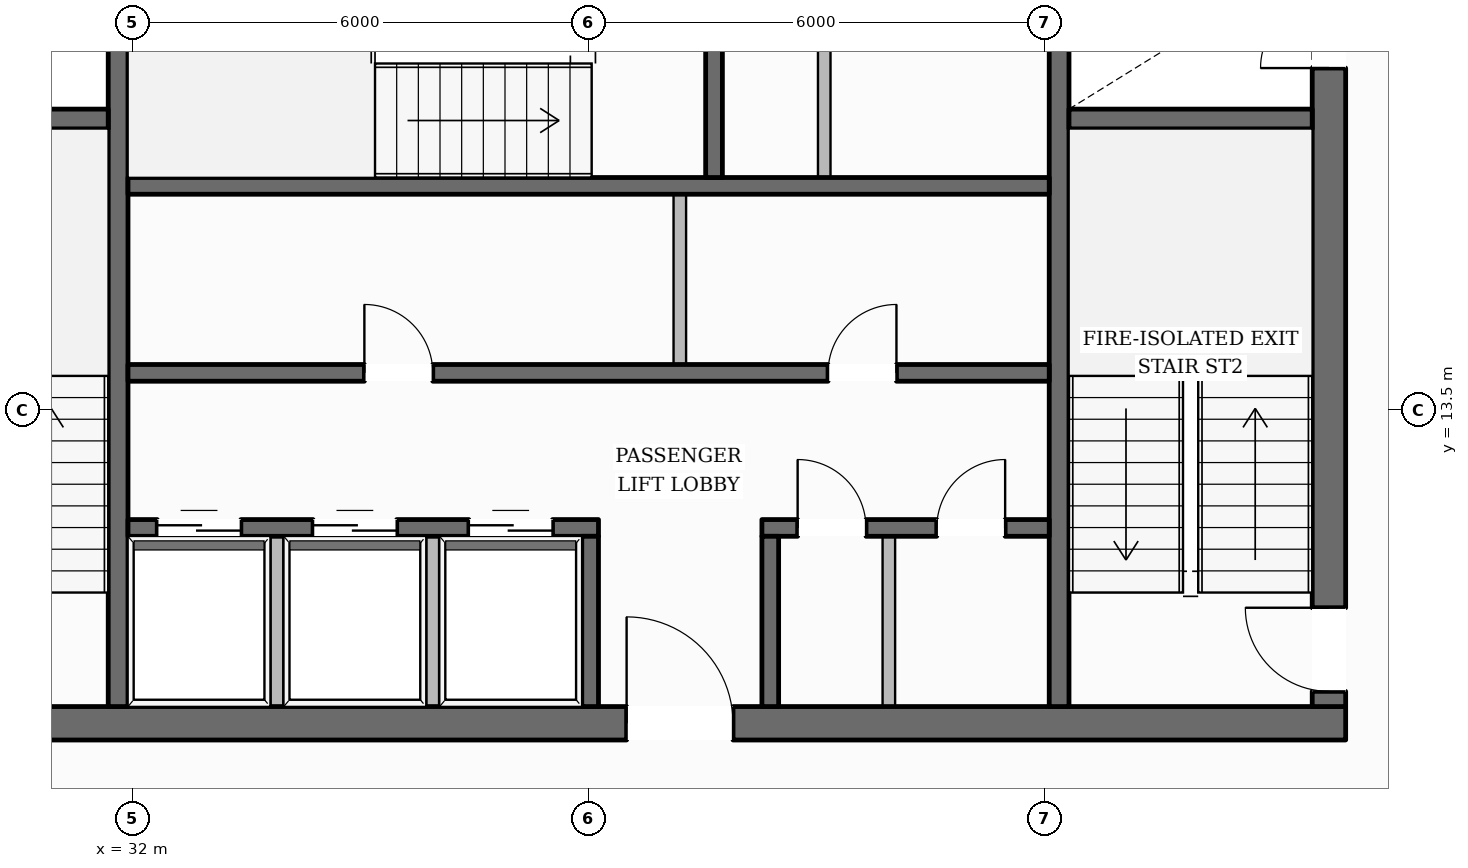
"""IFC4 building model, lengths in metres.
Left out: names, types, materials, properties, quantities, classifications, styles, units other than length and angle.
Written with IfcOpenShell. Run it as: python <this file> out.ifc"""

import sys

from ifc_helpers import new_model, si_unit, direction, frame, frame_2d, origin, place, context, subcontext, project, spatial, rectangle, extrude, element, fill, save


model = new_model("IFC4")
c1 = context("Model", 3, precision=1e-05, world=origin(), true_north=direction((0.0, 1.0)))
c2 = subcontext(c1, "Body", "Model", "MODEL_VIEW")
j1 = project(units=[si_unit("LENGTHUNIT", "METRE"), si_unit("PLANEANGLEUNIT", "RADIAN")], contexts=[c1])
p1 = place(None, origin())
s1 = spatial("IfcSite", under=j1, at=p1, CompositionType="ELEMENT")
p2 = place(p1, origin())
s2 = spatial("IfcBuilding", under=s1, at=p2, CompositionType="ELEMENT")
p3 = place(p2, frame((0.0, 0.0, 176.55)))
s3 = spatial("IfcBuildingStorey", under=s2, at=p3, CompositionType="ELEMENT", Elevation=176.55)
p4 = place(p3, frame((28.04, 9.38, 0.0), z_axis=(0.0, 0.0, 1.0), x_axis=(1.0, 0.0, 0.0)))
e1 = element("IfcWall", 1, at=p4, inside=s3, PredefinedType="SOLIDWALL", context=c2, shape_type="SweptSolid", body=[
    extrude(rectangle(XDim=19.92, YDim=0.44, at=frame_2d((9.96, 0.0))), origin(), (0.0, 0.0, 1.0), 3.6),
])
p5 = place(p4, frame((10.46, 0.0, 0.0)))
e2 = element("IfcOpeningElement", 2, at=p5, cuts=e1, PredefinedType="OPENING", context=c2, shape_type="SweptSolid", body=[
    extrude(rectangle(XDim=1.4, YDim=2.2, at=frame_2d((0.7, 1.1))), frame((0.0, 0.23, 0.0), z_axis=(0.0, -1.0, 0.0), x_axis=(1.0, 0.0, 0.0)), (0.0, 0.0, 1.0), 0.46),
])
p6 = place(p3, frame((47.74, 9.6, 0.0), z_axis=(0.0, 0.0, 1.0), x_axis=(0.0, 1.0, 0.0)))
e3 = element("IfcWall", 3, at=p6, inside=s3, PredefinedType="SOLIDWALL", context=c2, shape_type="SweptSolid", body=[
    extrude(rectangle(XDim=13.0, YDim=0.44, at=frame_2d((6.5, 0.0))), origin(), (0.0, 0.0, 1.0), 3.6),
])
p7 = place(p6, frame((0.2, 0.0, 0.0)))
e4 = element("IfcOpeningElement", 4, at=p7, cuts=e3, PredefinedType="OPENING", context=c2, shape_type="SweptSolid", body=[
    extrude(rectangle(XDim=1.1, YDim=2.15, at=frame_2d((0.55, 1.075))), frame((0.0, 0.23, 0.0), z_axis=(0.0, -1.0, 0.0), x_axis=(1.0, 0.0, 0.0)), (0.0, 0.0, 1.0), 0.46),
])
p8 = place(p6, frame((8.4, 0.0, 0.0)))
e5 = element("IfcOpeningElement", 5, at=p8, cuts=e3, PredefinedType="OPENING", context=c2, shape_type="SweptSolid", body=[
    extrude(rectangle(XDim=0.9, YDim=2.1, at=frame_2d((0.45, 1.05))), frame((0.0, 0.23, 0.0), z_axis=(0.0, -1.0, 0.0), x_axis=(1.0, 0.0, 0.0)), (0.0, 0.0, 1.0), 0.46),
])
p9 = place(p3, frame((31.81, 9.6, 0.0), z_axis=(0.0, 0.0, 1.0), x_axis=(0.0, 1.0, 0.0)))
e6 = element("IfcWall", 6, at=p9, inside=s3, PredefinedType="SHEAR", context=c2, shape_type="SweptSolid", body=[
    extrude(rectangle(XDim=13.0, YDim=0.26, at=frame_2d((6.5, 0.0))), origin(), (0.0, 0.0, 1.0), 3.6),
])
p10 = place(p9, frame((10.925, 0.0, 0.0)))
e7 = element("IfcOpeningElement", 7, at=p10, cuts=e6, PredefinedType="OPENING", context=c2, shape_type="SweptSolid", body=[
    extrude(rectangle(XDim=1.25, YDim=2.25, at=frame_2d((0.625, 1.125))), frame((0.0, 0.14, 0.0), z_axis=(0.0, -1.0, 0.0), x_axis=(1.0, 0.0, 0.0)), (0.0, 0.0, 1.0), 0.28),
])
p11 = place(p3, frame((44.19, 9.6, 0.0), z_axis=(0.0, 0.0, 1.0), x_axis=(0.0, 1.0, 0.0)))
e8 = element("IfcWall", 8, at=p11, inside=s3, PredefinedType="SHEAR", context=c2, shape_type="SweptSolid", body=[
    extrude(rectangle(XDim=13.0, YDim=0.26, at=frame_2d((6.5, 0.0))), origin(), (0.0, 0.0, 1.0), 3.6),
])
p12 = place(p11, frame((10.925, 0.0, 0.0)))
e9 = element("IfcOpeningElement", 9, at=p12, cuts=e8, PredefinedType="OPENING", context=c2, shape_type="SweptSolid", body=[
    extrude(rectangle(XDim=1.25, YDim=2.25, at=frame_2d((0.625, 1.125))), frame((0.0, 0.14, 0.0), z_axis=(0.0, -1.0, 0.0), x_axis=(1.0, 0.0, 0.0)), (0.0, 0.0, 1.0), 0.28),
])
for number, where, z_axis, x_axis in (
    (10, (28.48, 17.33, 0.0), (0.0, 0.0, 1.0), (1.0, 0.0, 0.0)),
    (11, (44.32, 17.33, 0.0), (0.0, 0.0, 1.0), (1.0, 0.0, 0.0)),
):
    element("IfcWall", number, at=place(p3, frame(where, z_axis=z_axis, x_axis=x_axis)), inside=s3, PredefinedType="SHEAR", context=c2, shape_type="SweptSolid", body=[
        extrude(rectangle(XDim=3.2, YDim=0.26, at=frame_2d((1.6, 0.0))), origin(), (0.0, 0.0, 1.0), 3.6),
    ])
p13 = place(p3, frame((31.94, 16.45, 0.0), z_axis=(0.0, 0.0, 1.0), x_axis=(1.0, 0.0, 0.0)))
e12 = element("IfcWall", 12, at=p13, inside=s3, PredefinedType="SOLIDWALL", context=c2, shape_type="SweptSolid", body=[
    extrude(rectangle(XDim=12.12, YDim=0.22, at=frame_2d((6.06, 0.0))), origin(), (0.0, 0.0, 1.0), 3.6),
])
p14 = place(p3, frame((39.65, 16.56, 0.0), z_axis=(0.0, 0.0, 1.0), x_axis=(0.0, 1.0, 0.0)))
e13 = element("IfcWall", 13, at=p14, inside=s3, PredefinedType="SOLIDWALL", context=c2, shape_type="SweptSolid", body=[
    extrude(rectangle(XDim=3.2, YDim=0.22, at=frame_2d((1.6, 0.0))), origin(), (0.0, 0.0, 1.0), 3.6),
])
p15 = place(p3, frame((31.94, 13.99, 0.0), z_axis=(0.0, 0.0, 1.0), x_axis=(1.0, 0.0, 0.0)))
e14 = element("IfcWall", 14, at=p15, inside=s3, PredefinedType="SOLIDWALL", context=c2, shape_type="SweptSolid", body=[
    extrude(rectangle(XDim=12.12, YDim=0.22, at=frame_2d((6.06, 0.0))), origin(), (0.0, 0.0, 1.0), 3.6),
])
p16 = place(p15, frame((3.11, 0.0, 0.0)))
e15 = element("IfcOpeningElement", 15, at=p16, cuts=e14, PredefinedType="OPENING", context=c2, shape_type="SweptSolid", body=[
    extrude(rectangle(XDim=0.9, YDim=2.1, at=frame_2d((0.45, 1.05))), frame((0.0, 0.12, 0.0), z_axis=(0.0, -1.0, 0.0), x_axis=(1.0, 0.0, 0.0)), (0.0, 0.0, 1.0), 0.24),
])
p17 = place(p15, frame((9.21, 0.0, 0.0)))
e16 = element("IfcOpeningElement", 16, at=p17, cuts=e14, PredefinedType="OPENING", context=c2, shape_type="SweptSolid", body=[
    extrude(rectangle(XDim=0.9, YDim=2.1, at=frame_2d((0.45, 1.05))), frame((0.0, 0.12, 0.0), z_axis=(0.0, -1.0, 0.0), x_axis=(1.0, 0.0, 0.0)), (0.0, 0.0, 1.0), 0.24),
])
p18 = place(p3, frame((31.94, 11.95, 0.0), z_axis=(0.0, 0.0, 1.0), x_axis=(1.0, 0.0, 0.0)))
e17 = element("IfcWall", 17, at=p18, inside=s3, PredefinedType="SOLIDWALL", context=c2, shape_type="SweptSolid", body=[
    extrude(rectangle(XDim=6.19, YDim=0.22, at=frame_2d((3.095, 0.0))), origin(), (0.0, 0.0, 1.0), 3.6),
])
p19 = place(p18, frame((0.385, 0.0, 0.0)))
e18 = element("IfcOpeningElement", 18, at=p19, cuts=e17, PredefinedType="OPENING", context=c2, shape_type="SweptSolid", body=[
    extrude(rectangle(XDim=1.1, YDim=2.2, at=frame_2d((0.55, 1.1))), frame((0.0, 0.12, 0.0), z_axis=(0.0, -1.0, 0.0), x_axis=(1.0, 0.0, 0.0)), (0.0, 0.0, 1.0), 0.24),
])
p20 = place(p18, frame((2.435, 0.0, 0.0)))
e19 = element("IfcOpeningElement", 19, at=p20, cuts=e17, PredefinedType="OPENING", context=c2, shape_type="SweptSolid", body=[
    extrude(rectangle(XDim=1.1, YDim=2.2, at=frame_2d((0.55, 1.1))), frame((0.0, 0.12, 0.0), z_axis=(0.0, -1.0, 0.0), x_axis=(1.0, 0.0, 0.0)), (0.0, 0.0, 1.0), 0.24),
])
p21 = place(p18, frame((4.485, 0.0, 0.0)))
e20 = element("IfcOpeningElement", 20, at=p21, cuts=e17, PredefinedType="OPENING", context=c2, shape_type="SweptSolid", body=[
    extrude(rectangle(XDim=1.1, YDim=2.2, at=frame_2d((0.55, 1.1))), frame((0.0, 0.12, 0.0), z_axis=(0.0, -1.0, 0.0), x_axis=(1.0, 0.0, 0.0)), (0.0, 0.0, 1.0), 0.24),
])
p22 = place(p3, frame((40.28, 11.95, 0.0), z_axis=(0.0, 0.0, 1.0), x_axis=(1.0, 0.0, 0.0)))
e21 = element("IfcWall", 21, at=p22, inside=s3, PredefinedType="SOLIDWALL", context=c2, shape_type="SweptSolid", body=[
    extrude(rectangle(XDim=3.78, YDim=0.22, at=frame_2d((1.89, 0.0))), origin(), (0.0, 0.0, 1.0), 3.6),
])
p23 = place(p22, frame((0.47, 0.0, 0.0)))
e22 = element("IfcOpeningElement", 22, at=p23, cuts=e21, PredefinedType="OPENING", context=c2, shape_type="SweptSolid", body=[
    extrude(rectangle(XDim=0.9, YDim=2.1, at=frame_2d((0.45, 1.05))), frame((0.0, 0.12, 0.0), z_axis=(0.0, -1.0, 0.0), x_axis=(1.0, 0.0, 0.0)), (0.0, 0.0, 1.0), 0.24),
])
p24 = place(p22, frame((2.3, 0.0, 0.0)))
e23 = element("IfcOpeningElement", 23, at=p24, cuts=e21, PredefinedType="OPENING", context=c2, shape_type="SweptSolid", body=[
    extrude(rectangle(XDim=0.9, YDim=2.1, at=frame_2d((0.45, 1.05))), frame((0.0, 0.12, 0.0), z_axis=(0.0, -1.0, 0.0), x_axis=(1.0, 0.0, 0.0)), (0.0, 0.0, 1.0), 0.24),
])
for number, where, z_axis, x_axis in (
    (24, (38.02, 9.6, 0.0), (0.0, 0.0, 1.0), (0.0, 1.0, 0.0)),
    (25, (40.39, 9.6, 0.0), (0.0, 0.0, 1.0), (0.0, 1.0, 0.0)),
):
    element("IfcWall", number, at=place(p3, frame(where, z_axis=z_axis, x_axis=x_axis)), inside=s3, PredefinedType="SOLIDWALL", context=c2, shape_type="SweptSolid", body=[
        extrude(rectangle(XDim=2.24, YDim=0.22, at=frame_2d((1.12, 0.0))), origin(), (0.0, 0.0, 1.0), 3.6),
    ])
p25 = place(p3, frame((15.13, 12.109, 0.0), z_axis=(0.0, 0.0, 1.0), x_axis=(0.493717133856, 0.869622557054, 0.0)))
e26 = element("IfcWall", 26, at=p25, inside=s3, PredefinedType="STANDARD", context=c2, shape_type="SweptSolid", body=[
    extrude(rectangle(XDim=37.245, YDim=0.35, at=frame_2d((18.623, 0.0))), origin(), (0.0, 0.0, 1.0), 3.132),
])
p26 = place(p25, frame((27.334, 0.0, 0.0)))
e27 = element("IfcOpeningElement", 27, at=p26, cuts=e26, PredefinedType="OPENING", context=c2, shape_type="SweptSolid", body=[
    extrude(rectangle(XDim=1.0, YDim=2.2, at=frame_2d((0.5, 1.1))), frame((0.0, 0.185, 0.0), z_axis=(0.0, -1.0, 0.0), x_axis=(1.0, 0.0, 0.0)), (0.0, 0.0, 1.0), 0.37),
])
p27 = place(p25, frame((33.014, 0.0, 0.65)))
e28 = element("IfcOpeningElement", 28, at=p27, cuts=e26, PredefinedType="OPENING", context=c2, shape_type="SweptSolid", body=[
    extrude(rectangle(XDim=1.45, YDim=1.75, at=frame_2d((0.725, 0.875))), frame((0.0, 0.185, 0.0), z_axis=(0.0, -1.0, 0.0), x_axis=(1.0, 0.0, 0.0)), (0.0, 0.0, 1.0), 0.37),
])
p28 = place(p25, frame((20.918, 0.0, 0.65)))
e29 = element("IfcOpeningElement", 29, at=p28, cuts=e26, PredefinedType="OPENING", context=c2, shape_type="SweptSolid", body=[
    extrude(rectangle(XDim=1.45, YDim=1.75, at=frame_2d((0.725, 0.875))), frame((0.0, 0.185, 0.0), z_axis=(0.0, -1.0, 0.0), x_axis=(1.0, 0.0, 0.0)), (0.0, 0.0, 1.0), 0.37),
])
p29 = place(p25, frame((8.822, 0.0, 0.65)))
e30 = element("IfcOpeningElement", 30, at=p29, cuts=e26, PredefinedType="OPENING", context=c2, shape_type="SweptSolid", body=[
    extrude(rectangle(XDim=1.45, YDim=1.75, at=frame_2d((0.725, 0.875))), frame((0.0, 0.185, 0.0), z_axis=(0.0, -1.0, 0.0), x_axis=(1.0, 0.0, 0.0)), (0.0, 0.0, 1.0), 0.37),
])
p30 = place(p25, frame((2.774, 0.0, 0.65)))
e31 = element("IfcOpeningElement", 31, at=p30, cuts=e26, PredefinedType="OPENING", context=c2, shape_type="SweptSolid", body=[
    extrude(rectangle(XDim=1.45, YDim=1.75, at=frame_2d((0.725, 0.875))), frame((0.0, 0.185, 0.0), z_axis=(0.0, -1.0, 0.0), x_axis=(1.0, 0.0, 0.0)), (0.0, 0.0, 1.0), 0.37),
])
p31 = place(p3, frame((42.622, 44.415, 0.0), z_axis=(0.0, 0.0, 1.0), x_axis=(0.501018185811, -0.865436755336, 0.0)))
e32 = element("IfcWall", 32, at=p31, inside=s3, PredefinedType="STANDARD", context=c2, shape_type="SweptSolid", body=[
    extrude(rectangle(XDim=37.783, YDim=0.35, at=frame_2d((18.892, 0.0))), origin(), (0.0, 0.0, 1.0), 3.132),
])
p32 = place(p31, frame((27.737, 0.0, 0.0)))
e33 = element("IfcOpeningElement", 33, at=p32, cuts=e32, PredefinedType="OPENING", context=c2, shape_type="SweptSolid", body=[
    extrude(rectangle(XDim=1.0, YDim=2.2, at=frame_2d((0.5, 1.1))), frame((0.0, 0.185, 0.0), z_axis=(0.0, -1.0, 0.0), x_axis=(1.0, 0.0, 0.0)), (0.0, 0.0, 1.0), 0.37),
])
p33 = place(p31, frame((33.513, 0.0, 0.65)))
e34 = element("IfcOpeningElement", 34, at=p33, cuts=e32, PredefinedType="OPENING", context=c2, shape_type="SweptSolid", body=[
    extrude(rectangle(XDim=1.45, YDim=1.75, at=frame_2d((0.725, 0.875))), frame((0.0, 0.185, 0.0), z_axis=(0.0, -1.0, 0.0), x_axis=(1.0, 0.0, 0.0)), (0.0, 0.0, 1.0), 0.37),
])
p34 = place(p31, frame((21.235, 0.0, 0.65)))
e35 = element("IfcOpeningElement", 35, at=p34, cuts=e32, PredefinedType="OPENING", context=c2, shape_type="SweptSolid", body=[
    extrude(rectangle(XDim=1.45, YDim=1.75, at=frame_2d((0.725, 0.875))), frame((0.0, 0.185, 0.0), z_axis=(0.0, -1.0, 0.0), x_axis=(1.0, 0.0, 0.0)), (0.0, 0.0, 1.0), 0.37),
])
p35 = place(p31, frame((8.958, 0.0, 0.65)))
e36 = element("IfcOpeningElement", 36, at=p35, cuts=e32, PredefinedType="OPENING", context=c2, shape_type="SweptSolid", body=[
    extrude(rectangle(XDim=1.45, YDim=1.75, at=frame_2d((0.725, 0.875))), frame((0.0, 0.185, 0.0), z_axis=(0.0, -1.0, 0.0), x_axis=(1.0, 0.0, 0.0)), (0.0, 0.0, 1.0), 0.37),
])
p36 = place(p31, frame((2.819, 0.0, 0.65)))
e37 = element("IfcOpeningElement", 37, at=p36, cuts=e32, PredefinedType="OPENING", context=c2, shape_type="SweptSolid", body=[
    extrude(rectangle(XDim=1.45, YDim=1.75, at=frame_2d((0.725, 0.875))), frame((0.0, 0.185, 0.0), z_axis=(0.0, -1.0, 0.0), x_axis=(1.0, 0.0, 0.0)), (0.0, 0.0, 1.0), 0.37),
])
for number, where, z_axis, x_axis in (
    (38, (33.9, 9.52, 0.0), (0.0, 0.0, 1.0), (0.0, 1.0, 0.0)),
    (39, (35.95, 9.52, 0.0), (0.0, 0.0, 1.0), (0.0, 1.0, 0.0)),
):
    element("IfcWall", number, at=place(p3, frame(where, z_axis=z_axis, x_axis=x_axis)), inside=s3, PredefinedType="PARTITIONING", context=c2, shape_type="SweptSolid", body=[
        extrude(rectangle(XDim=2.32, YDim=0.165, at=frame_2d((1.16, 0.0))), origin(), (0.0, 0.0, 1.0), 3.6),
    ])
p37 = place(p3, frame((39.2, 14.1, 0.0), z_axis=(0.0, 0.0, 1.0), x_axis=(0.0, 1.0, 0.0)))
e40 = element("IfcWall", 40, at=p37, inside=s3, PredefinedType="PARTITIONING", context=c2, shape_type="SweptSolid", body=[
    extrude(rectangle(XDim=2.24, YDim=0.165, at=frame_2d((1.12, 0.0))), origin(), (0.0, 0.0, 1.0), 3.6),
])
p38 = place(p3, frame((41.1, 16.56, 0.0), z_axis=(0.0, 0.0, 1.0), x_axis=(0.0, 1.0, 0.0)))
e41 = element("IfcWall", 41, at=p38, inside=s3, PredefinedType="PARTITIONING", context=c2, shape_type="SweptSolid", body=[
    extrude(rectangle(XDim=3.2, YDim=0.165, at=frame_2d((1.6, 0.0))), origin(), (0.0, 0.0, 1.0), 3.6),
])
p39 = place(p3, frame((41.95, 9.52, 0.0), z_axis=(0.0, 0.0, 1.0), x_axis=(0.0, 1.0, 0.0)))
e42 = element("IfcWall", 42, at=p39, inside=s3, PredefinedType="PARTITIONING", context=c2, shape_type="SweptSolid", body=[
    extrude(rectangle(XDim=2.32, YDim=0.165, at=frame_2d((1.16, 0.0))), origin(), (0.0, 0.0, 1.0), 3.6),
])
p40 = place(p7, origin())
e43 = element("IfcDoor", 43, at=p40, inside=s3, OperationType="SINGLE_SWING_RIGHT", PredefinedType="DOOR", context=c2, shape_type="SweptSolid", body=[
    extrude(rectangle(XDim=1.1, YDim=2.15, at=frame_2d((0.55, 1.075))), frame((0.0, 0.025, 0.0), z_axis=(0.0, -1.0, 0.0), x_axis=(1.0, 0.0, 0.0)), (0.0, 0.0, 1.0), 0.05),
])
fill(e4, e43)
p41 = place(p8, origin())
e44 = element("IfcDoor", 44, at=p41, inside=s3, OperationType="SINGLE_SWING_LEFT", PredefinedType="DOOR", context=c2, shape_type="SweptSolid", body=[
    extrude(rectangle(XDim=0.9, YDim=2.1, at=frame_2d((0.45, 1.05))), frame((0.0, 0.025, 0.0), z_axis=(0.0, -1.0, 0.0), x_axis=(1.0, 0.0, 0.0)), (0.0, 0.0, 1.0), 0.05),
])
fill(e5, e44)
p42 = place(p5, origin())
e45 = element("IfcDoor", 45, at=p42, inside=s3, OperationType="SINGLE_SWING_LEFT", PredefinedType="DOOR", context=c2, shape_type="SweptSolid", body=[
    extrude(rectangle(XDim=1.4, YDim=2.2, at=frame_2d((0.7, 1.1))), frame((0.0, 0.025, 0.0), z_axis=(0.0, -1.0, 0.0), x_axis=(1.0, 0.0, 0.0)), (0.0, 0.0, 1.0), 0.05),
])
fill(e2, e45)
p43 = place(p19, origin())
e46 = element("IfcDoor", 46, at=p43, inside=s3, OperationType="DOUBLE_DOOR_SLIDING", PredefinedType="DOOR", context=c2, shape_type="SweptSolid", body=[
    extrude(rectangle(XDim=1.1, YDim=2.2, at=frame_2d((0.55, 1.1))), frame((0.0, 0.025, 0.0), z_axis=(0.0, -1.0, 0.0), x_axis=(1.0, 0.0, 0.0)), (0.0, 0.0, 1.0), 0.05),
])
fill(e18, e46)
p44 = place(p20, origin())
e47 = element("IfcDoor", 47, at=p44, inside=s3, OperationType="DOUBLE_DOOR_SLIDING", PredefinedType="DOOR", context=c2, shape_type="SweptSolid", body=[
    extrude(rectangle(XDim=1.1, YDim=2.2, at=frame_2d((0.55, 1.1))), frame((0.0, 0.025, 0.0), z_axis=(0.0, -1.0, 0.0), x_axis=(1.0, 0.0, 0.0)), (0.0, 0.0, 1.0), 0.05),
])
fill(e19, e47)
p45 = place(p21, origin())
e48 = element("IfcDoor", 48, at=p45, inside=s3, OperationType="DOUBLE_DOOR_SLIDING", PredefinedType="DOOR", context=c2, shape_type="SweptSolid", body=[
    extrude(rectangle(XDim=1.1, YDim=2.2, at=frame_2d((0.55, 1.1))), frame((0.0, 0.025, 0.0), z_axis=(0.0, -1.0, 0.0), x_axis=(1.0, 0.0, 0.0)), (0.0, 0.0, 1.0), 0.05),
])
fill(e20, e48)
p46 = place(p16, origin())
e49 = element("IfcDoor", 49, at=p46, inside=s3, OperationType="SINGLE_SWING_LEFT", PredefinedType="DOOR", context=c2, shape_type="SweptSolid", body=[
    extrude(rectangle(XDim=0.9, YDim=2.1, at=frame_2d((0.45, 1.05))), frame((0.0, 0.025, 0.0), z_axis=(0.0, -1.0, 0.0), x_axis=(1.0, 0.0, 0.0)), (0.0, 0.0, 1.0), 0.05),
])
fill(e15, e49)
p47 = place(p17, origin())
e50 = element("IfcDoor", 50, at=p47, inside=s3, OperationType="SINGLE_SWING_RIGHT", PredefinedType="DOOR", context=c2, shape_type="SweptSolid", body=[
    extrude(rectangle(XDim=0.9, YDim=2.1, at=frame_2d((0.45, 1.05))), frame((0.0, 0.025, 0.0), z_axis=(0.0, -1.0, 0.0), x_axis=(1.0, 0.0, 0.0)), (0.0, 0.0, 1.0), 0.05),
])
fill(e16, e50)
p48 = place(p23, origin())
e51 = element("IfcDoor", 51, at=p48, inside=s3, OperationType="SINGLE_SWING_LEFT", PredefinedType="DOOR", context=c2, shape_type="SweptSolid", body=[
    extrude(rectangle(XDim=0.9, YDim=2.1, at=frame_2d((0.45, 1.05))), frame((0.0, 0.025, 0.0), z_axis=(0.0, -1.0, 0.0), x_axis=(1.0, 0.0, 0.0)), (0.0, 0.0, 1.0), 0.05),
])
fill(e22, e51)
p49 = place(p24, origin())
e52 = element("IfcDoor", 52, at=p49, inside=s3, OperationType="SINGLE_SWING_RIGHT", PredefinedType="DOOR", context=c2, shape_type="SweptSolid", body=[
    extrude(rectangle(XDim=0.9, YDim=2.1, at=frame_2d((0.45, 1.05))), frame((0.0, 0.025, 0.0), z_axis=(0.0, -1.0, 0.0), x_axis=(1.0, 0.0, 0.0)), (0.0, 0.0, 1.0), 0.05),
])
fill(e23, e52)
save(model, sys.argv[1])
